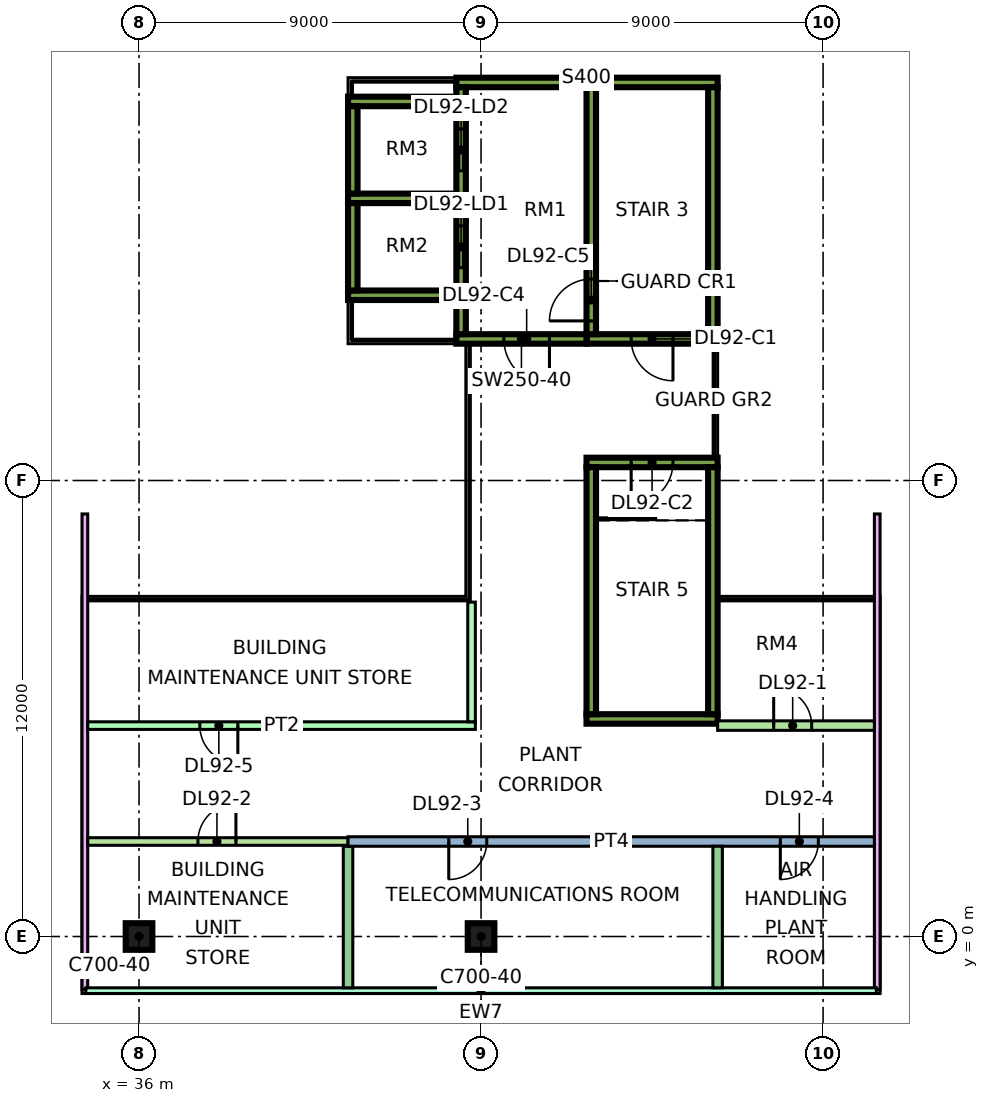
"""IFC4 building model, lengths in metres.
Left out: names, types, materials, properties, quantities, classifications, styles, units other than length and angle.
Written with IfcOpenShell. Run it as: python <this file> out.ifc"""

import sys

from ifc_helpers import new_model, si_unit, direction, frame, frame_2d, origin, origin_2d, place, context, subcontext, project, spatial, polyline, rectangle, outline, extrude, element, fill, save


model = new_model("IFC4")
c1 = context("Model", 3, precision=1e-05, world=origin(), true_north=direction((0.0, 1.0)))
c2 = subcontext(c1, "Body", "Model", "MODEL_VIEW")
j1 = project(units=[si_unit("LENGTHUNIT", "METRE"), si_unit("PLANEANGLEUNIT", "RADIAN")], contexts=[c1])
p1 = place(None, origin())
s1 = spatial("IfcSite", under=j1, at=p1, CompositionType="ELEMENT")
p2 = place(p1, origin())
s2 = spatial("IfcBuilding", under=s1, at=p2, CompositionType="ELEMENT")
p3 = place(p2, frame((0.0, 0.0, 393.4)))
s3 = spatial("IfcBuildingStorey", under=s2, at=p3, CompositionType="ELEMENT", Elevation=393.4)
for number, where, z_axis, x_axis in (
    (1, (36.0, 0.0, 0.0), (0.0, 0.0, 1.0), (1.0, 0.0, 0.0)),
    (2, (45.0, 0.0, 0.0), (0.0, 0.0, 1.0), (1.0, 0.0, 0.0)),
):
    element("IfcColumn", number, at=place(p3, frame(where, z_axis=z_axis, x_axis=x_axis)), inside=s3, PredefinedType="COLUMN", context=c2, shape_type="SweptSolid", body=[
        extrude(rectangle(XDim=0.7, YDim=0.7, at=origin_2d()), origin(), (0.0, 0.0, 1.0), 4.5),
    ])
p4 = place(p3, frame((47.775, 15.725, 0.0), z_axis=(0.0, 0.0, 1.0), x_axis=(1.0, 0.0, 0.0)))
e3 = element("IfcWall", 3, at=p4, inside=s3, PredefinedType="SHEAR", context=c2, shape_type="SweptSolid", body=[
    extrude(rectangle(XDim=3.45, YDim=0.25, at=frame_2d((1.725, 0.0))), origin(), (0.0, 0.0, 1.0), 4.5),
])
p5 = place(p4, frame((1.175, 0.0, 0.0)))
e4 = element("IfcOpeningElement", 4, at=p5, cuts=e3, PredefinedType="OPENING", context=c2, shape_type="SweptSolid", body=[
    extrude(rectangle(XDim=1.1, YDim=2.2, at=frame_2d((0.55, 1.1))), frame((0.0, 0.135, 0.0), z_axis=(0.0, -1.0, 0.0), x_axis=(1.0, 0.0, 0.0)), (0.0, 0.0, 1.0), 0.27),
])
p6 = place(p3, frame((47.775, 22.475, 0.0), z_axis=(0.0, 0.0, 1.0), x_axis=(1.0, 0.0, 0.0)))
e5 = element("IfcWall", 5, at=p6, inside=s3, PredefinedType="SHEAR", context=c2, shape_type="SweptSolid", body=[
    extrude(rectangle(XDim=3.45, YDim=0.25, at=frame_2d((1.725, 0.0))), origin(), (0.0, 0.0, 1.0), 4.5),
])
p7 = place(p3, frame((47.9, 15.85, 0.0), z_axis=(0.0, 0.0, 1.0), x_axis=(0.0, 1.0, 0.0)))
e6 = element("IfcWall", 6, at=p7, inside=s3, PredefinedType="SHEAR", context=c2, shape_type="SweptSolid", body=[
    extrude(rectangle(XDim=6.5, YDim=0.25, at=frame_2d((3.25, 0.0))), origin(), (0.0, 0.0, 1.0), 4.5),
])
p8 = place(p7, frame((0.35, 0.0, 0.0)))
e7 = element("IfcOpeningElement", 7, at=p8, cuts=e6, PredefinedType="OPENING", context=c2, shape_type="SweptSolid", body=[
    extrude(rectangle(XDim=1.1, YDim=2.2, at=frame_2d((0.55, 1.1))), frame((0.0, 0.135, 0.0), z_axis=(0.0, -1.0, 0.0), x_axis=(1.0, 0.0, 0.0)), (0.0, 0.0, 1.0), 0.27),
])
p9 = place(p3, frame((51.1, 15.85, 0.0), z_axis=(0.0, 0.0, 1.0), x_axis=(0.0, 1.0, 0.0)))
e8 = element("IfcWall", 8, at=p9, inside=s3, PredefinedType="SHEAR", context=c2, shape_type="SweptSolid", body=[
    extrude(rectangle(XDim=6.5, YDim=0.25, at=frame_2d((3.25, 0.0))), origin(), (0.0, 0.0, 1.0), 4.5),
])
p10 = place(p3, frame((47.775, 5.725, 0.0), z_axis=(0.0, 0.0, 1.0), x_axis=(1.0, 0.0, 0.0)))
e9 = element("IfcWall", 9, at=p10, inside=s3, PredefinedType="SHEAR", context=c2, shape_type="SweptSolid", body=[
    extrude(rectangle(XDim=3.45, YDim=0.25, at=frame_2d((1.725, 0.0))), origin(), (0.0, 0.0, 1.0), 4.5),
])
p11 = place(p3, frame((47.775, 12.475, 0.0), z_axis=(0.0, 0.0, 1.0), x_axis=(1.0, 0.0, 0.0)))
e10 = element("IfcWall", 10, at=p11, inside=s3, PredefinedType="SHEAR", context=c2, shape_type="SweptSolid", body=[
    extrude(rectangle(XDim=3.45, YDim=0.25, at=frame_2d((1.725, 0.0))), origin(), (0.0, 0.0, 1.0), 4.5),
])
p12 = place(p11, frame((1.175, 0.0, 0.0)))
e11 = element("IfcOpeningElement", 11, at=p12, cuts=e10, PredefinedType="OPENING", context=c2, shape_type="SweptSolid", body=[
    extrude(rectangle(XDim=1.1, YDim=2.2, at=frame_2d((0.55, 1.1))), frame((0.0, 0.135, 0.0), z_axis=(0.0, -1.0, 0.0), x_axis=(1.0, 0.0, 0.0)), (0.0, 0.0, 1.0), 0.27),
])
for number, where, z_axis, x_axis in (
    (12, (47.9, 5.85, 0.0), (0.0, 0.0, 1.0), (0.0, 1.0, 0.0)),
    (13, (51.1, 5.85, 0.0), (0.0, 0.0, 1.0), (0.0, 1.0, 0.0)),
):
    element("IfcWall", number, at=place(p3, frame(where, z_axis=z_axis, x_axis=x_axis)), inside=s3, PredefinedType="SHEAR", context=c2, shape_type="SweptSolid", body=[
        extrude(rectangle(XDim=6.5, YDim=0.25, at=frame_2d((3.25, 0.0))), origin(), (0.0, 0.0, 1.0), 4.5),
    ])
p13 = place(p3, frame((44.35, 15.725, 0.0), z_axis=(0.0, 0.0, 1.0), x_axis=(1.0, 0.0, 0.0)))
e14 = element("IfcWall", 14, at=p13, inside=s3, PredefinedType="SHEAR", context=c2, shape_type="SweptSolid", body=[
    extrude(rectangle(XDim=3.425, YDim=0.25, at=frame_2d((1.712, 0.0))), origin(), (0.0, 0.0, 1.0), 4.5),
])
p14 = place(p13, frame((1.25, 0.0, 0.0)))
e15 = element("IfcOpeningElement", 15, at=p14, cuts=e14, PredefinedType="OPENING", context=c2, shape_type="SweptSolid", body=[
    extrude(rectangle(XDim=1.2, YDim=2.2, at=frame_2d((0.6, 1.1))), frame((0.0, 0.135, 0.0), z_axis=(0.0, -1.0, 0.0), x_axis=(1.0, 0.0, 0.0)), (0.0, 0.0, 1.0), 0.27),
])
p15 = place(p3, frame((44.35, 22.475, 0.0), z_axis=(0.0, 0.0, 1.0), x_axis=(1.0, 0.0, 0.0)))
e16 = element("IfcWall", 16, at=p15, inside=s3, PredefinedType="SHEAR", context=c2, shape_type="SweptSolid", body=[
    extrude(rectangle(XDim=3.425, YDim=0.25, at=frame_2d((1.712, 0.0))), origin(), (0.0, 0.0, 1.0), 4.5),
])
p16 = place(p3, frame((44.475, 15.85, 0.0), z_axis=(0.0, 0.0, 1.0), x_axis=(0.0, 1.0, 0.0)))
e17 = element("IfcWall", 17, at=p16, inside=s3, PredefinedType="SHEAR", context=c2, shape_type="SweptSolid", body=[
    extrude(rectangle(XDim=6.5, YDim=0.25, at=frame_2d((3.25, 0.0))), origin(), (0.0, 0.0, 1.0), 4.5),
])
p17 = place(p16, frame((1.75, 0.0, 0.0)))
e18 = element("IfcOpeningElement", 18, at=p17, cuts=e17, PredefinedType="OPENING", context=c2, shape_type="SweptSolid", body=[
    extrude(rectangle(XDim=1.1, YDim=2.2, at=frame_2d((0.55, 1.1))), frame((0.0, 0.135, 0.0), z_axis=(0.0, -1.0, 0.0), x_axis=(1.0, 0.0, 0.0)), (0.0, 0.0, 1.0), 0.27),
])
p18 = place(p16, frame((4.3, 0.0, 0.0)))
e19 = element("IfcOpeningElement", 19, at=p18, cuts=e17, PredefinedType="OPENING", context=c2, shape_type="SweptSolid", body=[
    extrude(rectangle(XDim=1.1, YDim=2.2, at=frame_2d((0.55, 1.1))), frame((0.0, 0.135, 0.0), z_axis=(0.0, -1.0, 0.0), x_axis=(1.0, 0.0, 0.0)), (0.0, 0.0, 1.0), 0.27),
])
for number, where, z_axis, x_axis in (
    (20, (41.5, 16.875, 0.0), (0.0, 0.0, 1.0), (1.0, 0.0, 0.0)),
    (21, (41.5, 19.425, 0.0), (0.0, 0.0, 1.0), (1.0, 0.0, 0.0)),
    (22, (41.5, 21.975, 0.0), (0.0, 0.0, 1.0), (1.0, 0.0, 0.0)),
):
    element("IfcWall", number, at=place(p3, frame(where, z_axis=z_axis, x_axis=x_axis)), inside=s3, PredefinedType="SHEAR", context=c2, shape_type="SweptSolid", body=[
        extrude(rectangle(XDim=2.85, YDim=0.25, at=frame_2d((1.425, 0.0))), origin(), (0.0, 0.0, 1.0), 4.5),
    ])
for number, where, z_axis, x_axis in (
    (23, (41.625, 17.0, 0.0), (0.0, 0.0, 1.0), (0.0, 1.0, 0.0)),
    (24, (41.625, 19.55, 0.0), (0.0, 0.0, 1.0), (0.0, 1.0, 0.0)),
):
    element("IfcWall", number, at=place(p3, frame(where, z_axis=z_axis, x_axis=x_axis)), inside=s3, PredefinedType="SHEAR", context=c2, shape_type="SweptSolid", body=[
        extrude(rectangle(XDim=2.3, YDim=0.25, at=frame_2d((1.15, 0.0))), origin(), (0.0, 0.0, 1.0), 4.5),
    ])
p19 = place(p3, frame((55.425, -1.4, 0.0), z_axis=(0.0, 0.0, 1.0), x_axis=(0.0, 1.0, 0.0)))
e25 = element("IfcWall", 25, at=p19, inside=s3, PredefinedType="SOLIDWALL", context=c2, shape_type="SweptSolid", body=[
    extrude(outline(polyline([(0.0, 0.0), (12.52, 0.0), (12.52, 0.3), (9.926, 3.824), (8.933, 4.5), (0.0, 4.5), (0.0, 0.0)])), frame((0.0, 0.075, 0.0), z_axis=(0.0, -1.0, 0.0), x_axis=(1.0, 0.0, 0.0)), (0.0, 0.0, 1.0), 0.15),
])
p20 = place(p3, frame((34.575, 11.12, 0.0), z_axis=(0.0, 0.0, 1.0), x_axis=(0.0, -1.0, 0.0)))
e26 = element("IfcWall", 26, at=p20, inside=s3, PredefinedType="SOLIDWALL", context=c2, shape_type="SweptSolid", body=[
    extrude(outline(polyline([(0.0, 0.0), (12.52, 0.0), (12.52, 4.5), (3.587, 4.5), (2.594, 3.824), (1.602, 2.476), (0.609, 1.127), (0.0, 0.3), (0.0, 0.0)])), frame((0.0, 0.075, 0.0), z_axis=(0.0, -1.0, 0.0), x_axis=(1.0, 0.0, 0.0)), (0.0, 0.0, 1.0), 0.15),
])
p21 = place(p3, frame((34.6, -1.425, 0.0), z_axis=(0.0, 0.0, 1.0), x_axis=(1.0, 0.0, 0.0)))
e27 = element("IfcWall", 27, at=p21, inside=s3, PredefinedType="SOLIDWALL", context=c2, shape_type="SweptSolid", body=[
    extrude(rectangle(XDim=20.8, YDim=0.15, at=frame_2d((10.4, 0.0))), origin(), (0.0, 0.0, 1.0), 4.5),
])
p22 = place(p3, frame((34.65, 2.5, 0.0), z_axis=(0.0, 0.0, 1.0), x_axis=(1.0, 0.0, 0.0)))
e28 = element("IfcWall", 28, at=p22, inside=s3, PredefinedType="PARTITIONING", context=c2, shape_type="SweptSolid", body=[
    extrude(rectangle(XDim=6.85, YDim=0.2, at=frame_2d((3.425, 0.0))), origin(), (0.0, 0.0, 1.0), 3.781),
])
p23 = place(p22, frame((2.9, 0.0, 0.0)))
e29 = element("IfcOpeningElement", 29, at=p23, cuts=e28, PredefinedType="OPENING", context=c2, shape_type="SweptSolid", body=[
    extrude(rectangle(XDim=1.0, YDim=2.1, at=frame_2d((0.5, 1.05))), frame((0.0, 0.11, 0.0), z_axis=(0.0, -1.0, 0.0), x_axis=(1.0, 0.0, 0.0)), (0.0, 0.0, 1.0), 0.22),
])
p24 = place(p3, frame((34.65, 5.55, 0.0), z_axis=(0.0, 0.0, 1.0), x_axis=(1.0, 0.0, 0.0)))
e30 = element("IfcWall", 30, at=p24, inside=s3, PredefinedType="PARTITIONING", context=c2, shape_type="SweptSolid", body=[
    extrude(rectangle(XDim=10.2, YDim=0.2, at=frame_2d((5.1, 0.0))), origin(), (0.0, 0.0, 1.0), 2.558),
])
p25 = place(p24, frame((2.95, 0.0, 0.0)))
e31 = element("IfcOpeningElement", 31, at=p25, cuts=e30, PredefinedType="OPENING", context=c2, shape_type="SweptSolid", body=[
    extrude(rectangle(XDim=1.0, YDim=2.1, at=frame_2d((0.5, 1.05))), frame((0.0, 0.11, 0.0), z_axis=(0.0, -1.0, 0.0), x_axis=(1.0, 0.0, 0.0)), (0.0, 0.0, 1.0), 0.22),
])
p26 = place(p3, frame((41.5, -1.35, 0.0), z_axis=(0.0, 0.0, 1.0), x_axis=(0.0, 1.0, 0.0)))
e32 = element("IfcWall", 32, at=p26, inside=s3, PredefinedType="PARTITIONING", context=c2, shape_type="SweptSolid", body=[
    extrude(rectangle(XDim=3.725, YDim=0.25, at=frame_2d((1.863, 0.0))), origin(), (0.0, 0.0, 1.0), 4.1),
])
p27 = place(p3, frame((41.5, 2.5, 0.0), z_axis=(0.0, 0.0, 1.0), x_axis=(1.0, 0.0, 0.0)))
e33 = element("IfcWall", 33, at=p27, inside=s3, PredefinedType="PARTITIONING", context=c2, shape_type="SweptSolid", body=[
    extrude(rectangle(XDim=13.85, YDim=0.25, at=frame_2d((6.925, 0.0))), origin(), (0.0, 0.0, 1.0), 3.781),
])
p28 = place(p27, frame((2.65, 0.0, 0.0)))
e34 = element("IfcOpeningElement", 34, at=p28, cuts=e33, PredefinedType="OPENING", context=c2, shape_type="SweptSolid", body=[
    extrude(rectangle(XDim=1.0, YDim=2.1, at=frame_2d((0.5, 1.05))), frame((0.0, 0.135, 0.0), z_axis=(0.0, -1.0, 0.0), x_axis=(1.0, 0.0, 0.0)), (0.0, 0.0, 1.0), 0.27),
])
p29 = place(p27, frame((11.375, 0.0, 0.0)))
e35 = element("IfcOpeningElement", 35, at=p29, cuts=e33, PredefinedType="OPENING", context=c2, shape_type="SweptSolid", body=[
    extrude(rectangle(XDim=1.0, YDim=2.1, at=frame_2d((0.5, 1.05))), frame((0.0, 0.135, 0.0), z_axis=(0.0, -1.0, 0.0), x_axis=(1.0, 0.0, 0.0)), (0.0, 0.0, 1.0), 0.27),
])
p30 = place(p3, frame((44.75, 5.65, 0.0), z_axis=(0.0, 0.0, 1.0), x_axis=(0.0, 1.0, 0.0)))
e36 = element("IfcWall", 36, at=p30, inside=s3, PredefinedType="PARTITIONING", context=c2, shape_type="SweptSolid", body=[
    extrude(rectangle(XDim=3.15, YDim=0.2, at=frame_2d((1.575, 0.0))), origin(), (0.0, 0.0, 1.0), 2.558),
])
p31 = place(p3, frame((51.225, -1.35, 0.0), z_axis=(0.0, 0.0, 1.0), x_axis=(0.0, 1.0, 0.0)))
e37 = element("IfcWall", 37, at=p31, inside=s3, PredefinedType="PARTITIONING", context=c2, shape_type="SweptSolid", body=[
    extrude(rectangle(XDim=3.725, YDim=0.25, at=frame_2d((1.863, 0.0))), origin(), (0.0, 0.0, 1.0), 4.1),
])
p32 = place(p3, frame((51.225, 5.55, 0.0), z_axis=(0.0, 0.0, 1.0), x_axis=(1.0, 0.0, 0.0)))
e38 = element("IfcWall", 38, at=p32, inside=s3, PredefinedType="PARTITIONING", context=c2, shape_type="SweptSolid", body=[
    extrude(rectangle(XDim=4.125, YDim=0.25, at=frame_2d((2.062, 0.0))), origin(), (0.0, 0.0, 1.0), 2.558),
])
p33 = place(p32, frame((1.475, 0.0, 0.0)))
e39 = element("IfcOpeningElement", 39, at=p33, cuts=e38, PredefinedType="OPENING", context=c2, shape_type="SweptSolid", body=[
    extrude(rectangle(XDim=1.0, YDim=2.1, at=frame_2d((0.5, 1.05))), frame((0.0, 0.135, 0.0), z_axis=(0.0, -1.0, 0.0), x_axis=(1.0, 0.0, 0.0)), (0.0, 0.0, 1.0), 0.27),
])
p34 = place(p5, origin())
e40 = element("IfcDoor", 40, at=p34, inside=s3, OperationType="SINGLE_SWING_RIGHT", PredefinedType="DOOR", context=c2, shape_type="SweptSolid", body=[
    extrude(rectangle(XDim=1.1, YDim=2.2, at=frame_2d((0.55, 1.1))), frame((0.0, 0.025, 0.0), z_axis=(0.0, -1.0, 0.0), x_axis=(1.0, 0.0, 0.0)), (0.0, 0.0, 1.0), 0.05),
])
fill(e4, e40)
p35 = place(p12, frame((1.1, 0.0, 0.0), z_axis=(0.0, 0.0, 1.0), x_axis=(-1.0, 0.0, 0.0)))
e41 = element("IfcDoor", 41, at=p35, inside=s3, OperationType="SINGLE_SWING_LEFT", PredefinedType="DOOR", context=c2, shape_type="SweptSolid", body=[
    extrude(rectangle(XDim=1.1, YDim=2.2, at=frame_2d((0.55, 1.1))), frame((0.0, 0.025, 0.0), z_axis=(0.0, -1.0, 0.0), x_axis=(1.0, 0.0, 0.0)), (0.0, 0.0, 1.0), 0.05),
])
fill(e11, e41)
p36 = place(p14, origin())
e42 = element("IfcDoor", 42, at=p36, inside=s3, OperationType="SINGLE_SWING_RIGHT", PredefinedType="DOOR", context=c2, shape_type="SweptSolid", body=[
    extrude(rectangle(XDim=1.2, YDim=2.2, at=frame_2d((0.6, 1.1))), frame((0.0, 0.025, 0.0), z_axis=(0.0, -1.0, 0.0), x_axis=(1.0, 0.0, 0.0)), (0.0, 0.0, 1.0), 0.05),
])
fill(e15, e42)
p37 = place(p8, origin())
e43 = element("IfcDoor", 43, at=p37, inside=s3, OperationType="SINGLE_SWING_LEFT", PredefinedType="DOOR", context=c2, shape_type="SweptSolid", body=[
    extrude(rectangle(XDim=1.1, YDim=2.2, at=frame_2d((0.55, 1.1))), frame((0.0, 0.025, 0.0), z_axis=(0.0, -1.0, 0.0), x_axis=(1.0, 0.0, 0.0)), (0.0, 0.0, 1.0), 0.05),
])
fill(e7, e43)
p38 = place(p17, origin())
e44 = element("IfcDoor", 44, at=p38, inside=s3, OperationType="DOUBLE_DOOR_SLIDING", PredefinedType="DOOR", context=c2, shape_type="SweptSolid", body=[
    extrude(rectangle(XDim=1.1, YDim=2.2, at=frame_2d((0.55, 1.1))), frame((0.0, 0.025, 0.0), z_axis=(0.0, -1.0, 0.0), x_axis=(1.0, 0.0, 0.0)), (0.0, 0.0, 1.0), 0.05),
])
fill(e18, e44)
p39 = place(p18, origin())
e45 = element("IfcDoor", 45, at=p39, inside=s3, OperationType="DOUBLE_DOOR_SLIDING", PredefinedType="DOOR", context=c2, shape_type="SweptSolid", body=[
    extrude(rectangle(XDim=1.1, YDim=2.2, at=frame_2d((0.55, 1.1))), frame((0.0, 0.025, 0.0), z_axis=(0.0, -1.0, 0.0), x_axis=(1.0, 0.0, 0.0)), (0.0, 0.0, 1.0), 0.05),
])
fill(e19, e45)
p40 = place(p33, origin())
e46 = element("IfcDoor", 46, at=p40, inside=s3, OperationType="SINGLE_SWING_LEFT", PredefinedType="DOOR", context=c2, shape_type="SweptSolid", body=[
    extrude(rectangle(XDim=1.0, YDim=2.1, at=frame_2d((0.5, 1.05))), frame((0.0, 0.025, 0.0), z_axis=(0.0, -1.0, 0.0), x_axis=(1.0, 0.0, 0.0)), (0.0, 0.0, 1.0), 0.05),
])
fill(e39, e46)
p41 = place(p23, frame((1.0, 0.0, 0.0), z_axis=(0.0, 0.0, 1.0), x_axis=(-1.0, 0.0, 0.0)))
e47 = element("IfcDoor", 47, at=p41, inside=s3, OperationType="SINGLE_SWING_RIGHT", PredefinedType="DOOR", context=c2, shape_type="SweptSolid", body=[
    extrude(rectangle(XDim=1.0, YDim=2.1, at=frame_2d((0.5, 1.05))), frame((0.0, 0.025, 0.0), z_axis=(0.0, -1.0, 0.0), x_axis=(1.0, 0.0, 0.0)), (0.0, 0.0, 1.0), 0.05),
])
fill(e29, e47)
p42 = place(p28, frame((1.0, 0.0, 0.0), z_axis=(0.0, 0.0, 1.0), x_axis=(-1.0, 0.0, 0.0)))
e48 = element("IfcDoor", 48, at=p42, inside=s3, OperationType="SINGLE_SWING_LEFT", PredefinedType="DOOR", context=c2, shape_type="SweptSolid", body=[
    extrude(rectangle(XDim=1.0, YDim=2.1, at=frame_2d((0.5, 1.05))), frame((0.0, 0.025, 0.0), z_axis=(0.0, -1.0, 0.0), x_axis=(1.0, 0.0, 0.0)), (0.0, 0.0, 1.0), 0.05),
])
fill(e34, e48)
p43 = place(p29, frame((1.0, 0.0, 0.0), z_axis=(0.0, 0.0, 1.0), x_axis=(-1.0, 0.0, 0.0)))
e49 = element("IfcDoor", 49, at=p43, inside=s3, OperationType="SINGLE_SWING_LEFT", PredefinedType="DOOR", context=c2, shape_type="SweptSolid", body=[
    extrude(rectangle(XDim=1.0, YDim=2.1, at=frame_2d((0.5, 1.05))), frame((0.0, 0.025, 0.0), z_axis=(0.0, -1.0, 0.0), x_axis=(1.0, 0.0, 0.0)), (0.0, 0.0, 1.0), 0.05),
])
fill(e35, e49)
p44 = place(p25, origin())
e50 = element("IfcDoor", 50, at=p44, inside=s3, OperationType="SINGLE_SWING_RIGHT", PredefinedType="DOOR", context=c2, shape_type="SweptSolid", body=[
    extrude(rectangle(XDim=1.0, YDim=2.1, at=frame_2d((0.5, 1.05))), frame((0.0, 0.025, 0.0), z_axis=(0.0, -1.0, 0.0), x_axis=(1.0, 0.0, 0.0)), (0.0, 0.0, 1.0), 0.05),
])
fill(e31, e50)
save(model, sys.argv[1])
